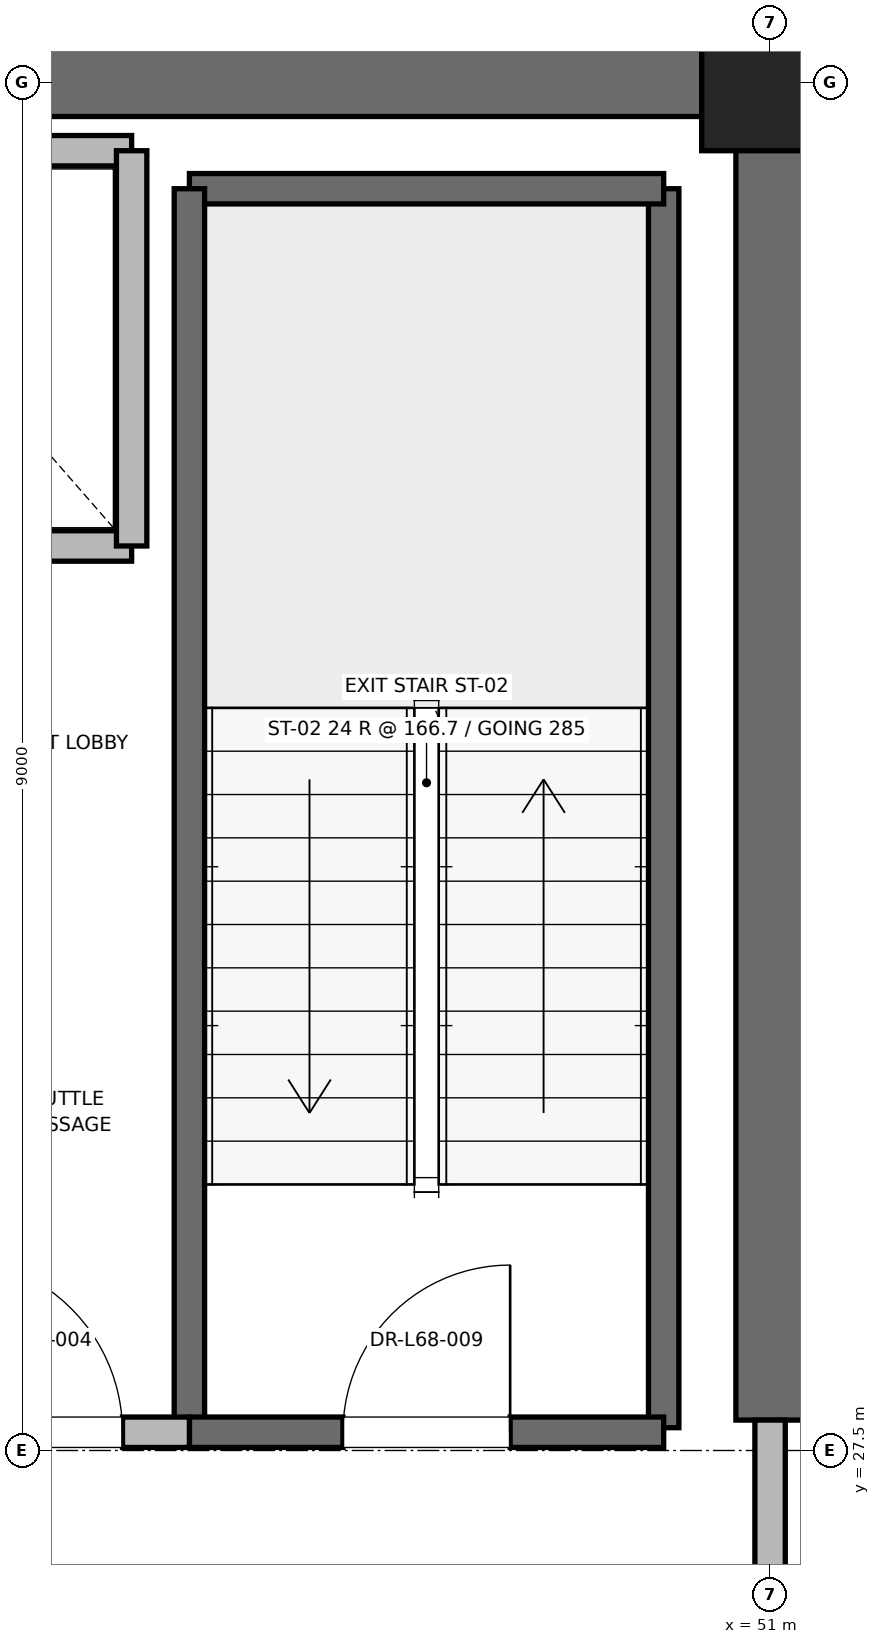
"""IFC4 building model, lengths in metres.
Left out: names, types, materials, properties, quantities, classifications, styles, units other than length and angle.
Written with IfcOpenShell. Run it as: python <this file> out.ifc"""

import sys

from ifc_helpers import new_model, si_unit, direction, frame, frame_2d, origin, origin_2d, place, context, subcontext, project, spatial, rectangle, extrude, element, fill, save


model = new_model("IFC4")
c1 = context("Model", 3, precision=1e-05, world=origin(), true_north=direction((0.0, 1.0)))
c2 = subcontext(c1, "Body", "Model", "MODEL_VIEW")
j1 = project(units=[si_unit("LENGTHUNIT", "METRE"), si_unit("PLANEANGLEUNIT", "RADIAN")], contexts=[c1])
p1 = place(None, origin())
s1 = spatial("IfcSite", under=j1, at=p1, CompositionType="ELEMENT")
p2 = place(p1, origin())
s2 = spatial("IfcBuilding", under=s1, at=p2, CompositionType="ELEMENT")
p3 = place(p2, frame((0.0, 0.0, 291.2)))
s3 = spatial("IfcBuildingStorey", under=s2, at=p3, CompositionType="ELEMENT", Elevation=291.2)
p4 = place(p3, frame((51.0, 36.5, 0.0), z_axis=(0.0, 0.0, 1.0), x_axis=(1.0, 0.0, 0.0)))
e1 = element("IfcColumn", 1, at=p4, inside=s3, PredefinedType="PILASTER", context=c2, shape_type="SweptSolid", body=[
    extrude(rectangle(XDim=0.9, YDim=0.9, at=origin_2d()), origin(), (0.0, 0.0, 1.0), 4.0),
])
p5 = place(p3, frame((45.2, 36.5, 0.0), z_axis=(0.0, 0.0, 1.0), x_axis=(1.0, 0.0, 0.0)))
e2 = element("IfcWall", 2, at=p5, inside=s3, PredefinedType="SHEAR", context=c2, shape_type="SweptSolid", body=[
    extrude(rectangle(XDim=5.8, YDim=0.45, at=frame_2d((2.9, 0.0))), origin(), (0.0, 0.0, 1.0), 3.7),
])
p6 = place(p3, frame((51.0, 27.7, 0.0), z_axis=(0.0, 0.0, 1.0), x_axis=(0.0, 1.0, 0.0)))
e3 = element("IfcWall", 3, at=p6, inside=s3, PredefinedType="SHEAR", context=c2, shape_type="SweptSolid", body=[
    extrude(rectangle(XDim=8.8, YDim=0.45, at=frame_2d((4.4, 0.0))), origin(), (0.0, 0.0, 1.0), 3.7),
])
p7 = place(p3, frame((50.3, 27.65, 0.0), z_axis=(0.0, 0.0, 1.0), x_axis=(0.0, 1.0, 0.0)))
e4 = element("IfcWall", 4, at=p7, inside=s3, PredefinedType="SOLIDWALL", context=c2, shape_type="SweptSolid", body=[
    extrude(rectangle(XDim=8.15, YDim=0.2, at=frame_2d((4.075, 0.0))), origin(), (0.0, 0.0, 1.0), 3.7),
])
p8 = place(p3, frame((47.18, 35.8, 0.0), z_axis=(0.0, 0.0, 1.0), x_axis=(1.0, 0.0, 0.0)))
e5 = element("IfcWall", 5, at=p8, inside=s3, PredefinedType="SOLIDWALL", context=c2, shape_type="SweptSolid", body=[
    extrude(rectangle(XDim=3.12, YDim=0.2, at=frame_2d((1.56, 0.0))), origin(), (0.0, 0.0, 1.0), 3.7),
])
p9 = place(p3, frame((47.18, 27.62, 0.0), z_axis=(0.0, 0.0, 1.0), x_axis=(0.0, 1.0, 0.0)))
e6 = element("IfcWall", 6, at=p9, inside=s3, PredefinedType="SOLIDWALL", context=c2, shape_type="SweptSolid", body=[
    extrude(rectangle(XDim=8.18, YDim=0.2, at=frame_2d((4.09, 0.0))), origin(), (0.0, 0.0, 1.0), 3.7),
])
p10 = place(p3, frame((47.18, 27.62, 0.0), z_axis=(0.0, 0.0, 1.0), x_axis=(1.0, 0.0, 0.0)))
e7 = element("IfcWall", 7, at=p10, inside=s3, PredefinedType="SOLIDWALL", context=c2, shape_type="SweptSolid", body=[
    extrude(rectangle(XDim=3.12, YDim=0.2, at=frame_2d((1.56, 0.0))), origin(), (0.0, 0.0, 1.0), 3.7),
])
p11 = place(p10, frame((1.01, 0.0, 0.0)))
e8 = element("IfcOpeningElement", 8, at=p11, cuts=e7, PredefinedType="OPENING", context=c2, shape_type="SweptSolid", body=[
    extrude(rectangle(XDim=1.1, YDim=2.15, at=frame_2d((0.55, 1.075))), frame((0.0, 0.1, 0.0), z_axis=(0.0, -1.0, 0.0), x_axis=(1.0, 0.0, 0.0)), (0.0, 0.0, 1.0), 0.2),
])
p12 = place(p3, frame((45.15, 27.62, 0.0), z_axis=(0.0, 0.0, 1.0), x_axis=(1.0, 0.0, 0.0)))
e9 = element("IfcWall", 9, at=p12, inside=s3, PredefinedType="PARTITIONING", context=c2, shape_type="SweptSolid", body=[
    extrude(rectangle(XDim=2.03, YDim=0.2, at=frame_2d((1.015, 0.0))), origin(), (0.0, 0.0, 1.0), 3.7),
])
p13 = place(p12, frame((0.44, 0.0, 0.0)))
e10 = element("IfcOpeningElement", 10, at=p13, cuts=e9, PredefinedType="OPENING", context=c2, shape_type="SweptSolid", body=[
    extrude(rectangle(XDim=1.15, YDim=2.2, at=frame_2d((0.575, 1.1))), frame((0.0, 0.1, 0.0), z_axis=(0.0, -1.0, 0.0), x_axis=(1.0, 0.0, 0.0)), (0.0, 0.0, 1.0), 0.2),
])
p14 = place(p3, frame((51.0, 24.3, 0.0), z_axis=(0.0, 0.0, 1.0), x_axis=(0.0, 1.0, 0.0)))
e11 = element("IfcWall", 11, at=p14, inside=s3, PredefinedType="PARTITIONING", context=c2, shape_type="SweptSolid", body=[
    extrude(rectangle(XDim=3.4, YDim=0.2, at=frame_2d((1.7, 0.0))), origin(), (0.0, 0.0, 1.0), 2.78),
])
p15 = place(p14, frame((1.125, 0.0, 0.0)))
e12 = element("IfcOpeningElement", 12, at=p15, cuts=e11, PredefinedType="OPENING", context=c2, shape_type="SweptSolid", body=[
    extrude(rectangle(XDim=1.15, YDim=2.2, at=frame_2d((0.575, 1.1))), frame((0.0, 0.1, 0.0), z_axis=(0.0, -1.0, 0.0), x_axis=(1.0, 0.0, 0.0)), (0.0, 0.0, 1.0), 0.2),
])
p16 = place(p3, frame((44.5, 33.45, 0.0), z_axis=(0.0, 0.0, 1.0), x_axis=(1.0, 0.0, 0.0)))
e13 = element("IfcWall", 13, at=p16, inside=s3, PredefinedType="SOLIDWALL", context=c2, shape_type="SweptSolid", body=[
    extrude(rectangle(XDim=2.3, YDim=0.2, at=frame_2d((1.15, 0.0))), origin(), (0.0, 0.0, 1.0), 3.7),
])
p17 = place(p3, frame((46.8, 36.05, 0.0), z_axis=(0.0, 0.0, 1.0), x_axis=(-1.0, 0.0, 0.0)))
e14 = element("IfcWall", 14, at=p17, inside=s3, PredefinedType="SOLIDWALL", context=c2, shape_type="SweptSolid", body=[
    extrude(rectangle(XDim=2.3, YDim=0.2, at=frame_2d((1.15, 0.0))), origin(), (0.0, 0.0, 1.0), 2.78),
])
p18 = place(p3, frame((46.8, 33.45, 0.0), z_axis=(0.0, 0.0, 1.0), x_axis=(0.0, 1.0, 0.0)))
e15 = element("IfcWall", 15, at=p18, inside=s3, PredefinedType="SOLIDWALL", context=c2, shape_type="SweptSolid", body=[
    extrude(rectangle(XDim=2.6, YDim=0.2, at=frame_2d((1.3, 0.0))), origin(), (0.0, 0.0, 1.0), 3.7),
])
p19 = place(p11, origin())
e16 = element("IfcDoor", 16, at=p19, inside=s3, OperationType="SINGLE_SWING_RIGHT", PredefinedType="DOOR", context=c2, shape_type="SweptSolid", body=[
    extrude(rectangle(XDim=1.1, YDim=2.15, at=frame_2d((0.55, 1.075))), frame((0.0, 0.025, 0.0), z_axis=(0.0, -1.0, 0.0), x_axis=(1.0, 0.0, 0.0)), (0.0, 0.0, 1.0), 0.05),
])
fill(e8, e16)
p20 = place(p13, origin())
e17 = element("IfcDoor", 17, at=p20, inside=s3, OperationType="SINGLE_SWING_LEFT", PredefinedType="DOOR", context=c2, shape_type="SweptSolid", body=[
    extrude(rectangle(XDim=1.15, YDim=2.2, at=frame_2d((0.575, 1.1))), frame((0.0, 0.025, 0.0), z_axis=(0.0, -1.0, 0.0), x_axis=(1.0, 0.0, 0.0)), (0.0, 0.0, 1.0), 0.05),
])
fill(e10, e17)
save(model, sys.argv[1])
